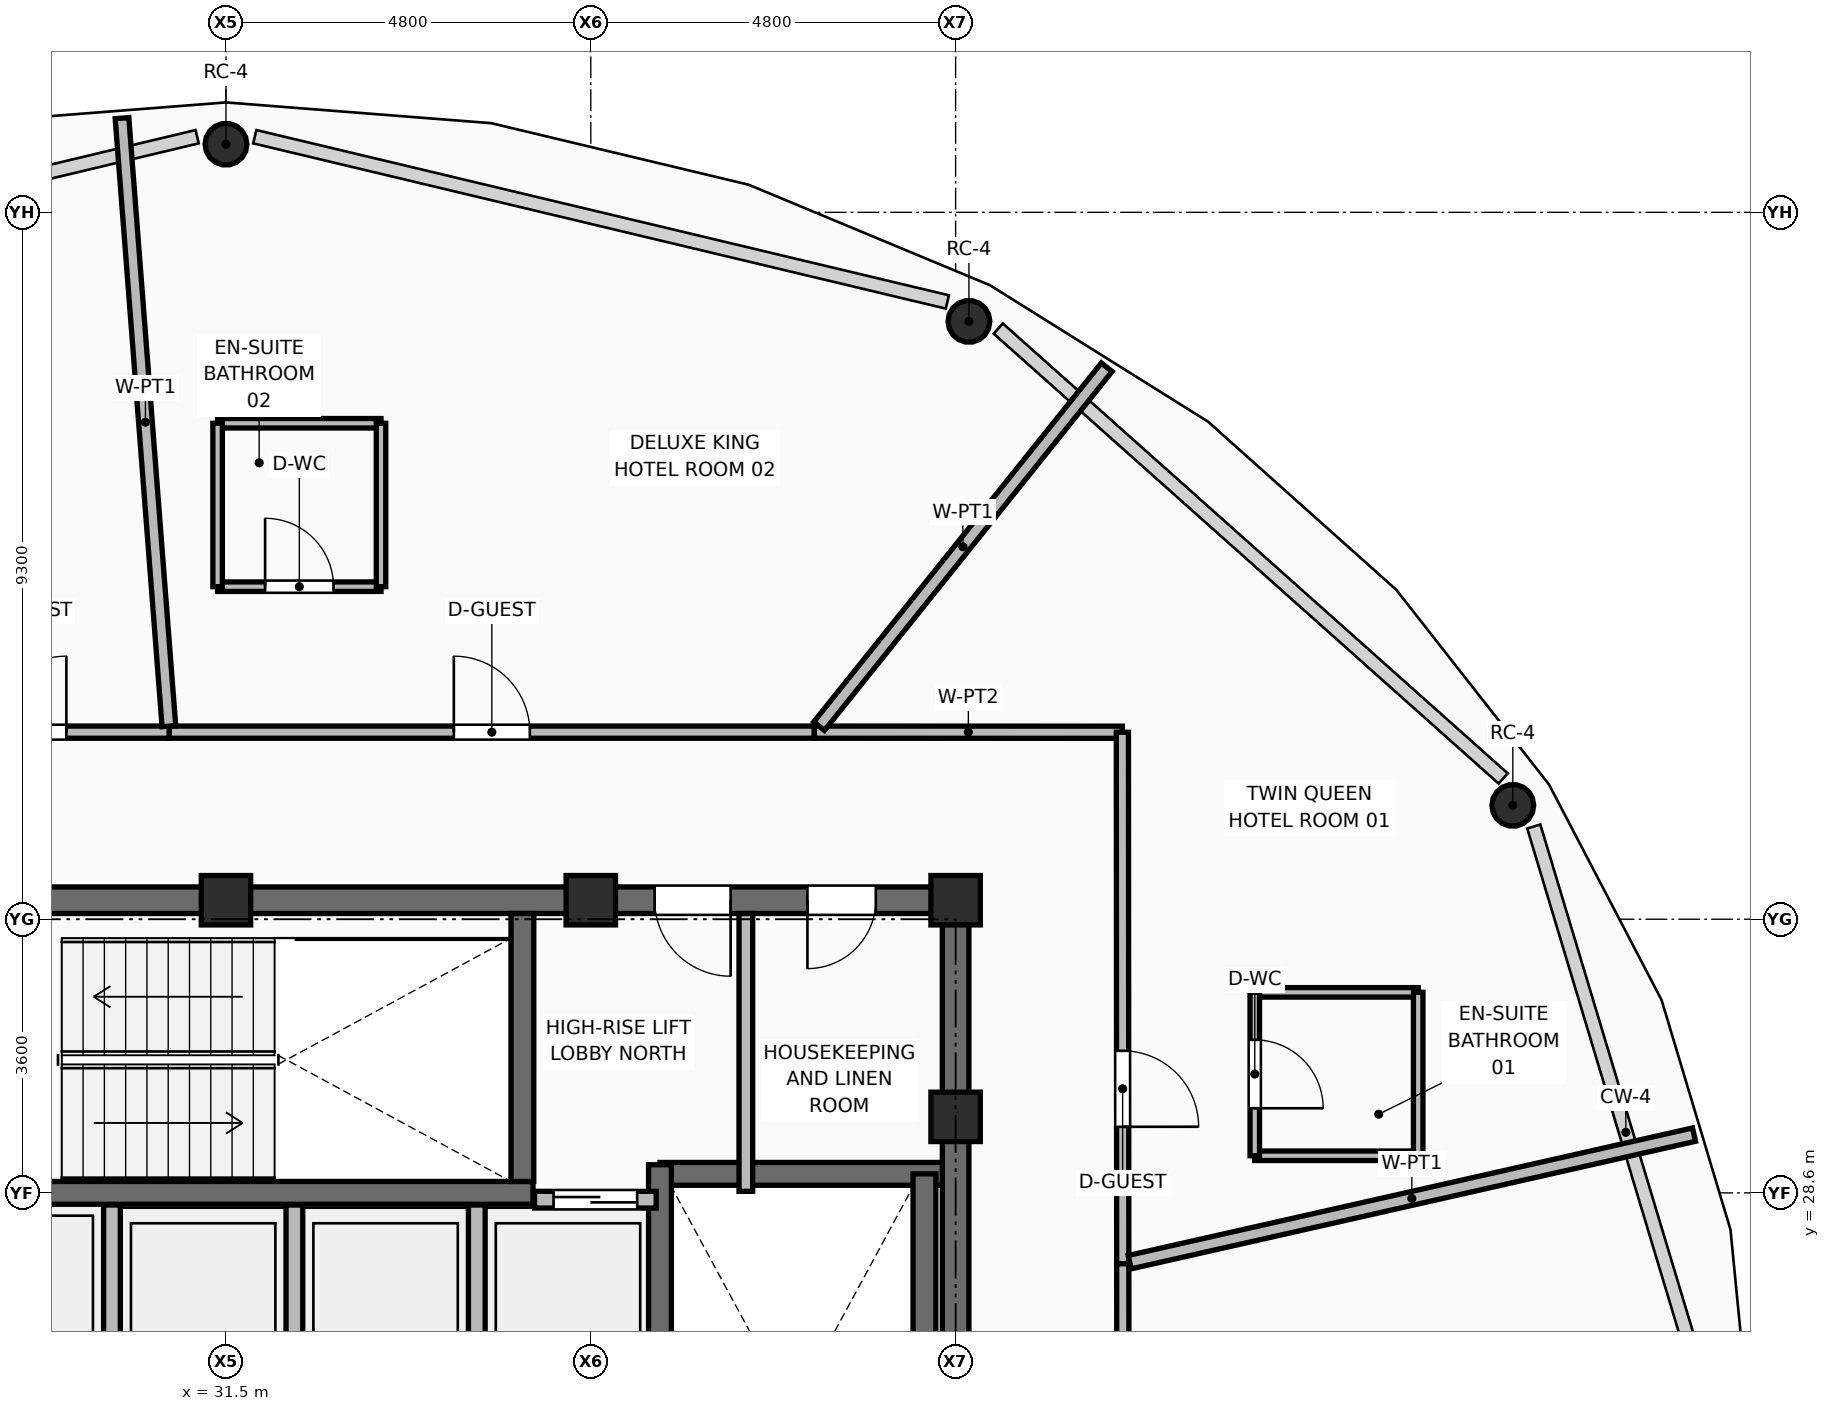
"""IFC4 building model, lengths in metres.
Left out: names, types, materials, properties, quantities, classifications, styles, units other than length and angle.
Written with IfcOpenShell. Run it as: python <this file> out.ifc"""

import sys

from ifc_helpers import new_model, si_unit, direction, frame, frame_2d, origin, origin_2d, place, context, subcontext, project, spatial, rectangle, hollow_circle, extrude, element, fill, save


model = new_model("IFC4")
c1 = context("Model", 3, precision=1e-05, world=origin(), true_north=direction((0.0, 1.0)))
c2 = subcontext(c1, "Body", "Model", "MODEL_VIEW")
j1 = project(units=[si_unit("LENGTHUNIT", "METRE"), si_unit("PLANEANGLEUNIT", "RADIAN")], contexts=[c1])
p1 = place(None, origin())
s1 = spatial("IfcSite", under=j1, at=p1, CompositionType="ELEMENT")
p2 = place(p1, origin())
s2 = spatial("IfcBuilding", under=s1, at=p2, CompositionType="ELEMENT")
p3 = place(p2, frame((0.0, 0.0, 278.85)))
s3 = spatial("IfcBuildingStorey", under=s2, at=p3, CompositionType="ELEMENT", Elevation=278.85)
for number, where, z_axis, x_axis in (
    (1, (41.1, 29.6, 0.0), (0.0, 0.0, 1.0), (1.0, 0.0, 0.0)),
    (2, (31.5, 32.45, 0.0), (0.0, 0.0, 1.0), (1.0, 0.0, 0.0)),
    (3, (36.3, 32.45, 0.0), (0.0, 0.0, 1.0), (1.0, 0.0, 0.0)),
    (4, (41.1, 32.45, 0.0), (0.0, 0.0, 1.0), (1.0, 0.0, 0.0)),
):
    element("IfcColumn", number, at=place(p3, frame(where, z_axis=z_axis, x_axis=x_axis)), inside=s3, PredefinedType="COLUMN", context=c2, shape_type="SweptSolid", body=[
        extrude(rectangle(XDim=0.65, YDim=0.65, at=origin_2d()), origin(), (0.0, 0.0, 1.0), 3.75),
    ])
p4 = place(p3, frame((48.431, 33.698, 0.0), z_axis=(-0.185218066702, -0.09531807333, 0.978063767177), x_axis=(0.457587432232, -0.889164631474, 0.0)))
e5 = element("IfcColumn", 5, at=p4, inside=s3, PredefinedType="COLUMN", context=c2, shape_type="SweptSolid", body=[
    extrude(hollow_circle(Radius=0.275, WallThickness=0.025, at=origin_2d()), origin(), (0.0, 0.0, 1.0), 3.65),
])
p5 = place(p3, frame((41.275, 40.065, 0.0), z_axis=(-0.107078897733, -0.165345373706, 0.980405537038), x_axis=(0.839360059296, -0.543575837265, 0.0)))
e6 = element("IfcColumn", 6, at=p5, inside=s3, PredefinedType="COLUMN", context=c2, shape_type="SweptSolid", body=[
    extrude(hollow_circle(Radius=0.275, WallThickness=0.025, at=origin_2d()), origin(), (0.0, 0.0, 1.0), 3.641),
])
p6 = place(p3, frame((31.5, 42.396, 0.0), z_axis=(0.0, -0.191376297921, 0.981516740863), x_axis=(1.0, 0.0, 0.0)))
e7 = element("IfcColumn", 7, at=p6, inside=s3, PredefinedType="COLUMN", context=c2, shape_type="SweptSolid", body=[
    extrude(hollow_circle(Radius=0.275, WallThickness=0.025, at=origin_2d()), origin(), (0.0, 0.0, 1.0), 3.637),
])
p7 = place(p3, frame((30.0, 25.71, 0.0), z_axis=(0.0, 0.0, 1.0), x_axis=(0.0, 1.0, 0.0)))
e8 = element("IfcWall", 8, at=p7, inside=s3, PredefinedType="PARTITIONING", context=c2, shape_type="SweptSolid", body=[
    extrude(rectangle(XDim=2.73, YDim=0.22, at=frame_2d((1.365, 0.0))), origin(), (0.0, 0.0, 1.0), 3.545),
])
p8 = place(p3, frame((32.4, 26.2, 0.0), z_axis=(0.0, 0.0, 1.0), x_axis=(0.0, 1.0, 0.0)))
e9 = element("IfcWall", 9, at=p8, inside=s3, PredefinedType="PARTITIONING", context=c2, shape_type="SweptSolid", body=[
    extrude(rectangle(XDim=2.24, YDim=0.22, at=frame_2d((1.12, 0.0))), origin(), (0.0, 0.0, 1.0), 3.545),
])
p9 = place(p3, frame((34.8, 26.23, 0.0), z_axis=(0.0, 0.0, 1.0), x_axis=(0.0, 1.0, 0.0)))
e10 = element("IfcWall", 10, at=p9, inside=s3, PredefinedType="PARTITIONING", context=c2, shape_type="SweptSolid", body=[
    extrude(rectangle(XDim=2.21, YDim=0.22, at=frame_2d((1.105, 0.0))), origin(), (0.0, 0.0, 1.0), 3.545),
])
p10 = place(p3, frame((21.725, 32.45, 0.0), z_axis=(0.0, 0.0, 1.0), x_axis=(1.0, 0.0, 0.0)))
e11 = element("IfcWall", 11, at=p10, inside=s3, PredefinedType="SHEAR", context=c2, shape_type="SweptSolid", body=[
    extrude(rectangle(XDim=19.55, YDim=0.35, at=frame_2d((9.775, 0.0))), origin(), (0.0, 0.0, 1.0), 3.57),
])
p11 = place(p10, frame((2.025, 0.0, 0.0)))
e12 = element("IfcOpeningElement", 12, at=p11, cuts=e11, PredefinedType="OPENING", context=c2, shape_type="SweptSolid", body=[
    extrude(rectangle(XDim=1.1, YDim=2.1, at=frame_2d((0.55, 1.05))), frame((0.0, 0.185, 0.0), z_axis=(0.0, -1.0, 0.0), x_axis=(1.0, 0.0, 0.0)), (0.0, 0.0, 1.0), 0.37),
])
p12 = place(p10, frame((15.415, 0.0, 0.0)))
e13 = element("IfcOpeningElement", 13, at=p12, cuts=e11, PredefinedType="OPENING", context=c2, shape_type="SweptSolid", body=[
    extrude(rectangle(XDim=1.0, YDim=2.1, at=frame_2d((0.5, 1.05))), frame((0.0, 0.185, 0.0), z_axis=(0.0, -1.0, 0.0), x_axis=(1.0, 0.0, 0.0)), (0.0, 0.0, 1.0), 0.37),
])
p13 = place(p10, frame((17.425, 0.0, 0.0)))
e14 = element("IfcOpeningElement", 14, at=p13, cuts=e11, PredefinedType="OPENING", context=c2, shape_type="SweptSolid", body=[
    extrude(rectangle(XDim=0.9, YDim=2.1, at=frame_2d((0.45, 1.05))), frame((0.0, 0.185, 0.0), z_axis=(0.0, -1.0, 0.0), x_axis=(1.0, 0.0, 0.0)), (0.0, 0.0, 1.0), 0.37),
])
p14 = place(p3, frame((41.1, 17.975, 0.0), z_axis=(0.0, 0.0, 1.0), x_axis=(0.0, 1.0, 0.0)))
e15 = element("IfcWall", 15, at=p14, inside=s3, PredefinedType="SHEAR", context=c2, shape_type="SweptSolid", body=[
    extrude(rectangle(XDim=14.3, YDim=0.35, at=frame_2d((7.15, 0.0))), origin(), (0.0, 0.0, 1.0), 3.57),
])
p15 = place(p14, frame((3.485, 0.0, 0.0)))
e16 = element("IfcOpeningElement", 16, at=p15, cuts=e15, PredefinedType="OPENING", context=c2, shape_type="SweptSolid", body=[
    extrude(rectangle(XDim=1.05, YDim=2.1, at=frame_2d((0.525, 1.05))), frame((0.0, 0.185, 0.0), z_axis=(0.0, -1.0, 0.0), x_axis=(1.0, 0.0, 0.0)), (0.0, 0.0, 1.0), 0.37),
])
p16 = place(p3, frame((37.21, 28.85, 0.0), z_axis=(0.0, 0.0, 1.0), x_axis=(1.0, 0.0, 0.0)))
e17 = element("IfcWall", 17, at=p16, inside=s3, PredefinedType="SHEAR", context=c2, shape_type="SweptSolid", body=[
    extrude(rectangle(XDim=3.715, YDim=0.3, at=frame_2d((1.857, 0.0))), origin(), (0.0, 0.0, 1.0), 3.57),
])
p17 = place(p3, frame((37.21, 20.98, 0.0), z_axis=(0.0, 0.0, 1.0), x_axis=(0.0, 1.0, 0.0)))
e18 = element("IfcWall", 18, at=p17, inside=s3, PredefinedType="SHEAR", context=c2, shape_type="SweptSolid", body=[
    extrude(rectangle(XDim=7.99, YDim=0.3, at=frame_2d((3.995, 0.0))), origin(), (0.0, 0.0, 1.0), 3.57),
])
p18 = place(p3, frame((40.69, 22.65, 0.0), z_axis=(0.0, 0.0, 1.0), x_axis=(0.0, 1.0, 0.0)))
e19 = element("IfcWall", 19, at=p18, inside=s3, PredefinedType="SHEAR", context=c2, shape_type="SweptSolid", body=[
    extrude(rectangle(XDim=6.2, YDim=0.3, at=frame_2d((3.1, 0.0))), origin(), (0.0, 0.0, 1.0), 3.57),
])
p19 = place(p3, frame((27.51, 28.6, 0.0), z_axis=(0.0, 0.0, 1.0), x_axis=(1.0, 0.0, 0.0)))
e20 = element("IfcWall", 20, at=p19, inside=s3, PredefinedType="SHEAR", context=c2, shape_type="SweptSolid", body=[
    extrude(rectangle(XDim=8.03, YDim=0.3, at=frame_2d((4.015, 0.0))), origin(), (0.0, 0.0, 1.0), 3.57),
])
p20 = place(p3, frame((35.4, 28.75, 0.0), z_axis=(0.0, 0.0, 1.0), x_axis=(0.0, 1.0, 0.0)))
e21 = element("IfcWall", 21, at=p20, inside=s3, PredefinedType="SHEAR", context=c2, shape_type="SweptSolid", body=[
    extrude(rectangle(XDim=3.525, YDim=0.3, at=frame_2d((1.762, 0.0))), origin(), (0.0, 0.0, 1.0), 3.57),
])
p21 = place(p3, frame((35.56, 28.51, 0.0), z_axis=(0.0, 0.0, 1.0), x_axis=(1.0, 0.0, 0.0)))
e22 = element("IfcWall", 22, at=p21, inside=s3, PredefinedType="PARTITIONING", context=c2, shape_type="SweptSolid", body=[
    extrude(rectangle(XDim=1.6, YDim=0.22, at=frame_2d((0.8, 0.0))), origin(), (0.0, 0.0, 1.0), 3.55),
])
p22 = place(p21, frame((0.25, 0.0, 0.0)))
e23 = element("IfcOpeningElement", 23, at=p22, cuts=e22, PredefinedType="OPENING", context=c2, shape_type="SweptSolid", body=[
    extrude(rectangle(XDim=1.1, YDim=2.2, at=frame_2d((0.55, 1.1))), frame((0.0, 0.12, 0.0), z_axis=(0.0, -1.0, 0.0), x_axis=(1.0, 0.0, 0.0)), (0.0, 0.0, 1.0), 0.24),
])
p23 = place(p3, frame((38.34, 28.62, 0.0), z_axis=(0.0, 0.0, 1.0), x_axis=(0.0, 1.0, 0.0)))
e24 = element("IfcWall", 24, at=p23, inside=s3, PredefinedType="PARTITIONING", context=c2, shape_type="SweptSolid", body=[
    extrude(rectangle(XDim=3.655, YDim=0.18, at=frame_2d((1.827, 0.0))), origin(), (0.0, 0.0, 1.0), 3.132),
])
p24 = place(p3, frame((27.195, 34.661, 0.0), z_axis=(0.0, 0.0, 1.0), x_axis=(1.0, 0.0, 0.0)))
e25 = element("IfcWall", 25, at=p24, inside=s3, PredefinedType="PARTITIONING", context=c2, shape_type="SweptSolid", body=[
    extrude(rectangle(XDim=3.56, YDim=0.16, at=frame_2d((1.78, 0.0))), origin(), (0.0, 0.0, 1.0), 3.55),
])
p25 = place(p24, frame((1.205, 0.0, 0.0)))
e26 = element("IfcOpeningElement", 26, at=p25, cuts=e25, PredefinedType="OPENING", context=c2, shape_type="SweptSolid", body=[
    extrude(rectangle(XDim=1.0, YDim=2.1, at=frame_2d((0.5, 1.05))), frame((0.0, 0.09, 0.0), z_axis=(0.0, -1.0, 0.0), x_axis=(1.0, 0.0, 0.0)), (0.0, 0.0, 1.0), 0.18),
])
p26 = place(p3, frame((30.755, 34.661, 0.0), z_axis=(0.0, 0.0, 1.0), x_axis=(1.0, 0.0, 0.0)))
e27 = element("IfcWall", 27, at=p26, inside=s3, PredefinedType="PARTITIONING", context=c2, shape_type="SweptSolid", body=[
    extrude(rectangle(XDim=8.486, YDim=0.16, at=frame_2d((4.243, 0.0))), origin(), (0.0, 0.0, 1.0), 3.132),
])
p27 = place(p26, frame((3.743, 0.0, 0.0)))
e28 = element("IfcOpeningElement", 28, at=p27, cuts=e27, PredefinedType="OPENING", context=c2, shape_type="SweptSolid", body=[
    extrude(rectangle(XDim=1.0, YDim=2.1, at=frame_2d((0.5, 1.05))), frame((0.0, 0.09, 0.0), z_axis=(0.0, -1.0, 0.0), x_axis=(1.0, 0.0, 0.0)), (0.0, 0.0, 1.0), 0.18),
])
p28 = place(p3, frame((39.241, 34.661, 0.0), z_axis=(0.0, 0.0, 1.0), x_axis=(0.999999970972, -0.000240949333, 0.0)))
e29 = element("IfcWall", 29, at=p28, inside=s3, PredefinedType="PARTITIONING", context=c2, shape_type="SweptSolid", body=[
    extrude(rectangle(XDim=4.053, YDim=0.16, at=frame_2d((2.026, 0.0))), origin(), (0.0, 0.0, 1.0), 3.132),
])
p29 = place(p3, frame((43.294, 34.66, 0.0), z_axis=(0.0, 0.0, 1.0), x_axis=(0.000733163229, -0.999999731236, 0.0)))
e30 = element("IfcWall", 30, at=p29, inside=s3, PredefinedType="PARTITIONING", context=c2, shape_type="SweptSolid", body=[
    extrude(rectangle(XDim=6.993, YDim=0.16, at=frame_2d((3.497, 0.0))), origin(), (0.0, 0.0, 1.0), 3.132),
])
p30 = place(p29, frame((4.191, 0.0, 0.0)))
e31 = element("IfcOpeningElement", 31, at=p30, cuts=e30, PredefinedType="OPENING", context=c2, shape_type="SweptSolid", body=[
    extrude(rectangle(XDim=1.0, YDim=2.1, at=frame_2d((0.5, 1.05))), frame((0.0, 0.09, 0.0), z_axis=(0.0, -1.0, 0.0), x_axis=(1.0, 0.0, 0.0)), (0.0, 0.0, 1.0), 0.18),
])
p31 = place(p3, frame((43.299, 27.667, 0.0), z_axis=(0.0, 0.0, 1.0), x_axis=(0.00070241144, -0.999999753309, 0.0)))
e32 = element("IfcWall", 32, at=p31, inside=s3, PredefinedType="PARTITIONING", context=c2, shape_type="SweptSolid", body=[
    extrude(rectangle(XDim=4.171, YDim=0.16, at=frame_2d((2.085, 0.0))), origin(), (0.0, 0.0, 1.0), 3.55),
])
p32 = place(p31, frame((1.486, 0.0, 0.0)))
e33 = element("IfcOpeningElement", 33, at=p32, cuts=e32, PredefinedType="OPENING", context=c2, shape_type="SweptSolid", body=[
    extrude(rectangle(XDim=1.2, YDim=2.1, at=frame_2d((0.6, 1.05))), frame((0.0, 0.09, 0.0), z_axis=(0.0, -1.0, 0.0), x_axis=(1.0, 0.0, 0.0)), (0.0, 0.0, 1.0), 0.18),
])
p33 = place(p3, frame((43.39, 27.688, 0.0), z_axis=(0.0, 0.0, 1.0), x_axis=(0.975402755126, 0.220430182356, 0.0)))
e34 = element("IfcWall", 34, at=p33, inside=s3, PredefinedType="PARTITIONING", context=c2, shape_type="SweptSolid", body=[
    extrude(rectangle(XDim=7.612, YDim=0.18, at=frame_2d((3.806, 0.0))), origin(), (0.0, 0.0, 1.0), 3.003),
])
p34 = place(p3, frame((39.304, 34.74, 0.0), z_axis=(0.0, 0.0, 1.0), x_axis=(0.625339403946, 0.78035288804, 0.0)))
e35 = element("IfcWall", 35, at=p34, inside=s3, PredefinedType="PARTITIONING", context=c2, shape_type="SweptSolid", body=[
    extrude(rectangle(XDim=6.051, YDim=0.18, at=frame_2d((3.025, 0.0))), origin(), (0.0, 0.0, 1.0), 3.003),
])
p35 = place(p3, frame((30.749, 34.74, 0.0), z_axis=(0.0, 0.0, 1.0), x_axis=(-0.076898952471, 0.997038891473, 0.0)))
e36 = element("IfcWall", 36, at=p35, inside=s3, PredefinedType="PARTITIONING", context=c2, shape_type="SweptSolid", body=[
    extrude(rectangle(XDim=8.023, YDim=0.18, at=frame_2d((4.011, 0.0))), origin(), (0.0, 0.0, 1.0), 3.003),
])
for number, where, z_axis, x_axis in (
    (37, (45.036, 29.088, 0.0), (0.0, 0.0, 1.0), (1.0, 0.0, 0.0)),
    (38, (45.036, 31.238, 0.0), (0.0, 0.0, 1.0), (1.0, 0.0, 0.0)),
):
    element("IfcWall", number, at=place(p3, frame(where, z_axis=z_axis, x_axis=x_axis)), inside=s3, PredefinedType="PARTITIONING", context=c2, shape_type="SweptSolid", body=[
        extrude(rectangle(XDim=2.15, YDim=0.125, at=frame_2d((1.075, 0.0))), origin(), (0.0, 0.0, 1.0), 3.55),
    ])
p36 = place(p3, frame((45.036, 29.088, 0.0), z_axis=(0.0, 0.0, 1.0), x_axis=(0.0, 1.0, 0.0)))
e39 = element("IfcWall", 39, at=p36, inside=s3, PredefinedType="PARTITIONING", context=c2, shape_type="SweptSolid", body=[
    extrude(rectangle(XDim=2.15, YDim=0.125, at=frame_2d((1.075, 0.0))), origin(), (0.0, 0.0, 1.0), 3.55),
])
p37 = place(p36, frame((0.625, 0.0, 0.0)))
e40 = element("IfcOpeningElement", 40, at=p37, cuts=e39, PredefinedType="OPENING", context=c2, shape_type="SweptSolid", body=[
    extrude(rectangle(XDim=0.9, YDim=2.1, at=frame_2d((0.45, 1.05))), frame((0.0, 0.073, 0.0), z_axis=(0.0, -1.0, 0.0), x_axis=(1.0, 0.0, 0.0)), (0.0, 0.0, 1.0), 0.145),
])
p38 = place(p3, frame((47.186, 29.088, 0.0), z_axis=(0.0, 0.0, 1.0), x_axis=(0.0, 1.0, 0.0)))
e41 = element("IfcWall", 41, at=p38, inside=s3, PredefinedType="PARTITIONING", context=c2, shape_type="SweptSolid", body=[
    extrude(rectangle(XDim=2.15, YDim=0.125, at=frame_2d((1.075, 0.0))), origin(), (0.0, 0.0, 1.0), 3.55),
])
p39 = place(p3, frame((31.39, 36.575, 0.0), z_axis=(0.0, 0.0, 1.0), x_axis=(1.0, 0.0, 0.0)))
e42 = element("IfcWall", 42, at=p39, inside=s3, PredefinedType="PARTITIONING", context=c2, shape_type="SweptSolid", body=[
    extrude(rectangle(XDim=2.15, YDim=0.125, at=frame_2d((1.075, 0.0))), origin(), (0.0, 0.0, 1.0), 3.132),
])
p40 = place(p39, frame((0.625, 0.0, 0.0)))
e43 = element("IfcOpeningElement", 43, at=p40, cuts=e42, PredefinedType="OPENING", context=c2, shape_type="SweptSolid", body=[
    extrude(rectangle(XDim=0.9, YDim=2.1, at=frame_2d((0.45, 1.05))), frame((0.0, 0.073, 0.0), z_axis=(0.0, -1.0, 0.0), x_axis=(1.0, 0.0, 0.0)), (0.0, 0.0, 1.0), 0.145),
])
for number, where, z_axis, x_axis in (
    (44, (31.39, 38.725, 0.0), (0.0, 0.0, 1.0), (1.0, 0.0, 0.0)),
    (45, (31.39, 36.575, 0.0), (0.0, 0.0, 1.0), (0.0, 1.0, 0.0)),
):
    element("IfcWall", number, at=place(p3, frame(where, z_axis=z_axis, x_axis=x_axis)), inside=s3, PredefinedType="PARTITIONING", context=c2, shape_type="SweptSolid", body=[
        extrude(rectangle(XDim=2.15, YDim=0.125, at=frame_2d((1.075, 0.0))), origin(), (0.0, 0.0, 1.0), 3.132),
    ])
p41 = place(p3, frame((33.54, 36.575, 0.0), z_axis=(0.0, 0.0, 1.0), x_axis=(0.0, 1.0, 0.0)))
e46 = element("IfcWall", 46, at=p41, inside=s3, PredefinedType="PARTITIONING", context=c2, shape_type="SweptSolid", body=[
    extrude(rectangle(XDim=2.15, YDim=0.125, at=frame_2d((1.075, 0.0))), origin(), (0.0, 0.0, 1.0), 3.55),
])
p42 = place(p22, origin())
e47 = element("IfcDoor", 47, at=p42, inside=s3, OperationType="DOUBLE_DOOR_SLIDING", PredefinedType="DOOR", context=c2, shape_type="SweptSolid", body=[
    extrude(rectangle(XDim=1.1, YDim=2.2, at=frame_2d((0.55, 1.1))), frame((0.0, 0.025, 0.0), z_axis=(0.0, -1.0, 0.0), x_axis=(1.0, 0.0, 0.0)), (0.0, 0.0, 1.0), 0.05),
])
fill(e23, e47)
p43 = place(p12, frame((1.0, 0.0, 0.0), z_axis=(0.0, 0.0, 1.0), x_axis=(-1.0, 0.0, 0.0)))
e48 = element("IfcDoor", 48, at=p43, inside=s3, OperationType="SINGLE_SWING_LEFT", PredefinedType="DOOR", context=c2, shape_type="SweptSolid", body=[
    extrude(rectangle(XDim=1.0, YDim=2.1, at=frame_2d((0.5, 1.05))), frame((0.0, 0.025, 0.0), z_axis=(0.0, -1.0, 0.0), x_axis=(1.0, 0.0, 0.0)), (0.0, 0.0, 1.0), 0.05),
])
fill(e13, e48)
p44 = place(p13, frame((0.9, 0.0, 0.0), z_axis=(0.0, 0.0, 1.0), x_axis=(-1.0, 0.0, 0.0)))
e49 = element("IfcDoor", 49, at=p44, inside=s3, OperationType="SINGLE_SWING_RIGHT", PredefinedType="DOOR", context=c2, shape_type="SweptSolid", body=[
    extrude(rectangle(XDim=0.9, YDim=2.1, at=frame_2d((0.45, 1.05))), frame((0.0, 0.025, 0.0), z_axis=(0.0, -1.0, 0.0), x_axis=(1.0, 0.0, 0.0)), (0.0, 0.0, 1.0), 0.05),
])
fill(e14, e49)
p45 = place(p37, frame((0.9, 0.0, 0.0), z_axis=(0.0, 0.0, 1.0), x_axis=(-1.0, 0.0, 0.0)))
e50 = element("IfcDoor", 50, at=p45, inside=s3, OperationType="SINGLE_SWING_RIGHT", PredefinedType="DOOR", context=c2, shape_type="SweptSolid", body=[
    extrude(rectangle(XDim=0.9, YDim=2.1, at=frame_2d((0.45, 1.05))), frame((0.0, 0.025, 0.0), z_axis=(0.0, -1.0, 0.0), x_axis=(1.0, 0.0, 0.0)), (0.0, 0.0, 1.0), 0.05),
])
fill(e40, e50)
p46 = place(p30, origin())
e51 = element("IfcDoor", 51, at=p46, inside=s3, OperationType="SINGLE_SWING_RIGHT", PredefinedType="DOOR", context=c2, shape_type="SweptSolid", body=[
    extrude(rectangle(XDim=1.0, YDim=2.1, at=frame_2d((0.5, 1.05))), frame((0.0, 0.025, 0.0), z_axis=(0.0, -1.0, 0.0), x_axis=(1.0, 0.0, 0.0)), (0.0, 0.0, 1.0), 0.05),
])
fill(e31, e51)
p47 = place(p40, origin())
e52 = element("IfcDoor", 52, at=p47, inside=s3, OperationType="SINGLE_SWING_LEFT", PredefinedType="DOOR", context=c2, shape_type="SweptSolid", body=[
    extrude(rectangle(XDim=0.9, YDim=2.1, at=frame_2d((0.45, 1.05))), frame((0.0, 0.025, 0.0), z_axis=(0.0, -1.0, 0.0), x_axis=(1.0, 0.0, 0.0)), (0.0, 0.0, 1.0), 0.05),
])
fill(e43, e52)
p48 = place(p27, origin())
e53 = element("IfcDoor", 53, at=p48, inside=s3, OperationType="SINGLE_SWING_LEFT", PredefinedType="DOOR", context=c2, shape_type="SweptSolid", body=[
    extrude(rectangle(XDim=1.0, YDim=2.1, at=frame_2d((0.5, 1.05))), frame((0.0, 0.025, 0.0), z_axis=(0.0, -1.0, 0.0), x_axis=(1.0, 0.0, 0.0)), (0.0, 0.0, 1.0), 0.05),
])
fill(e28, e53)
p49 = place(p25, origin())
e54 = element("IfcDoor", 54, at=p49, inside=s3, OperationType="SINGLE_SWING_RIGHT", PredefinedType="DOOR", context=c2, shape_type="SweptSolid", body=[
    extrude(rectangle(XDim=1.0, YDim=2.1, at=frame_2d((0.5, 1.05))), frame((0.0, 0.025, 0.0), z_axis=(0.0, -1.0, 0.0), x_axis=(1.0, 0.0, 0.0)), (0.0, 0.0, 1.0), 0.05),
])
fill(e26, e54)
save(model, sys.argv[1])
